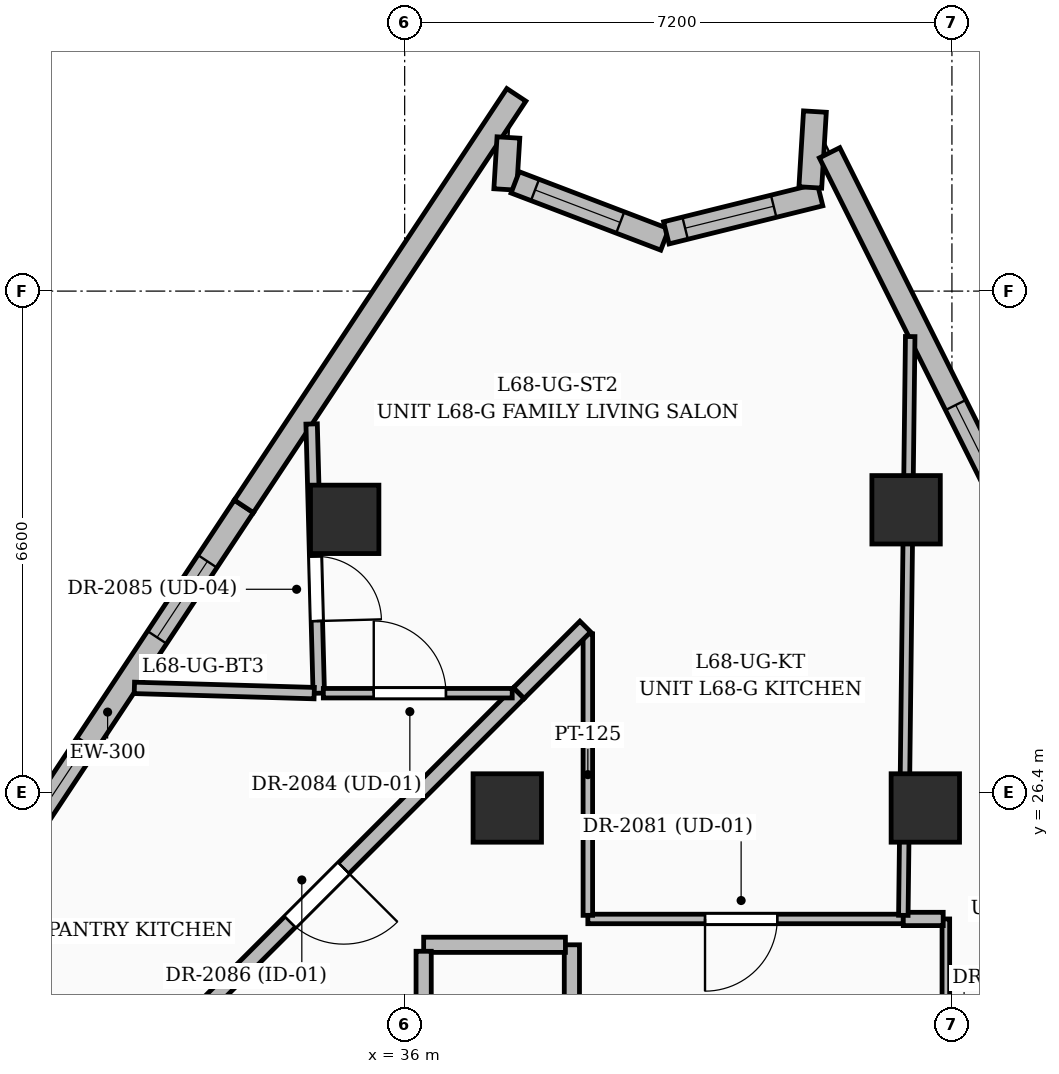
"""IFC4 building model, lengths in metres.
Left out: names, types, materials, properties, quantities, classifications, styles, units other than length and angle.
Written with IfcOpenShell. Run it as: python <this file> out.ifc"""

import sys

from ifc_helpers import new_model, si_unit, direction, frame, frame_2d, origin, origin_2d, place, context, subcontext, project, spatial, rectangle, extrude, element, fill, save


model = new_model("IFC4")
c1 = context("Model", 3, precision=1e-05, world=origin(), true_north=direction((0.0, 1.0)))
c2 = subcontext(c1, "Body", "Model", "MODEL_VIEW")
j1 = project(units=[si_unit("LENGTHUNIT", "METRE"), si_unit("PLANEANGLEUNIT", "RADIAN")], contexts=[c1])
p1 = place(None, origin())
s1 = spatial("IfcSite", under=j1, at=p1, CompositionType="ELEMENT")
p2 = place(p1, origin())
s2 = spatial("IfcBuilding", under=s1, at=p2, CompositionType="ELEMENT")
p3 = place(p2, frame((0.0, 0.0, 263.25)))
s3 = spatial("IfcBuildingStorey", under=s2, at=p3, CompositionType="ELEMENT", Elevation=263.25)
for number, where, z_axis, x_axis in (
    (1, (42.85, 26.2, 0.0), (0.0, 0.0, 1.0), (1.0, 0.0, 0.0)),
    (2, (37.35, 26.2, 0.0), (0.0, 0.0, 1.0), (1.0, 0.0, 0.0)),
    (3, (42.597, 30.123, 0.0), (0.0, 0.0, 1.0), (1.0, 0.0, 0.0)),
    (4, (35.211, 29.997, 0.0), (0.0, 0.0, 1.0), (1.0, 0.0, 0.0)),
):
    element("IfcColumn", number, at=place(p3, frame(where, z_axis=z_axis, x_axis=x_axis)), inside=s3, PredefinedType="COLUMN", context=c2, shape_type="SweptSolid", body=[
        extrude(rectangle(XDim=0.9, YDim=0.9, at=origin_2d()), origin(), (0.0, 0.0, 1.0), 3.75),
    ])
p4 = place(p3, frame((30.3, 24.755, 0.0), z_axis=(0.0, 0.0, 1.0), x_axis=(0.552146443909, 0.833747146609, 0.0)))
e5 = element("IfcWall", 5, at=p4, inside=s3, PredefinedType="SOLIDWALL", context=c2, shape_type="SweptSolid", body=[
    extrude(rectangle(XDim=6.493, YDim=0.3, at=frame_2d((3.246, 0.0))), origin(), (0.0, 0.0, 1.0), 3.5),
])
p5 = place(p4, frame((4.425, 0.0, 0.8)))
e6 = element("IfcOpeningElement", 6, at=p5, cuts=e5, PredefinedType="OPENING", context=c2, shape_type="SweptSolid", body=[
    extrude(rectangle(XDim=1.2, YDim=1.8, at=frame_2d((0.6, 0.9))), frame((0.0, 0.16, 0.0), z_axis=(0.0, -1.0, 0.0), x_axis=(1.0, 0.0, 0.0)), (0.0, 0.0, 1.0), 0.32),
])
p6 = place(p4, frame((1.55, 0.0, 0.8)))
e7 = element("IfcOpeningElement", 7, at=p6, cuts=e5, PredefinedType="OPENING", context=c2, shape_type="SweptSolid", body=[
    extrude(rectangle(XDim=1.2, YDim=1.8, at=frame_2d((0.6, 0.9))), frame((0.0, 0.16, 0.0), z_axis=(0.0, -1.0, 0.0), x_axis=(1.0, 0.0, 0.0)), (0.0, 0.0, 1.0), 0.32),
])
p7 = place(p3, frame((33.885, 30.168, 0.0), z_axis=(0.0, 0.0, 1.0), x_axis=(0.552102995184, 0.833775918763, 0.0)))
e8 = element("IfcWall", 8, at=p7, inside=s3, PredefinedType="SOLIDWALL", context=c2, shape_type="SweptSolid", body=[
    extrude(rectangle(XDim=6.493, YDim=0.3, at=frame_2d((3.247, 0.0))), origin(), (0.0, 0.0, 1.0), 3.5),
])
p8 = place(p3, frame((37.365, 35.021, 0.0), z_axis=(0.0, 0.0, 1.0), x_axis=(-0.060624262888, -0.998160657785, 0.0)))
e9 = element("IfcWall", 9, at=p8, inside=s3, PredefinedType="SOLIDWALL", context=c2, shape_type="SweptSolid", body=[
    extrude(rectangle(XDim=0.685, YDim=0.3, at=frame_2d((0.342, 0.0))), origin(), (0.0, 0.0, 1.0), 3.5),
])
p9 = place(p3, frame((37.454, 34.431, 0.0), z_axis=(0.0, 0.0, 1.0), x_axis=(0.934285742141, -0.356525107155, 0.0)))
e10 = element("IfcWall", 10, at=p9, inside=s3, PredefinedType="SOLIDWALL", context=c2, shape_type="SweptSolid", body=[
    extrude(rectangle(XDim=2.108, YDim=0.3, at=frame_2d((1.054, 0.0))), origin(), (0.0, 0.0, 1.0), 3.5),
])
p10 = place(p9, frame((0.28, 0.0, 0.8)))
e11 = element("IfcOpeningElement", 11, at=p10, cuts=e10, PredefinedType="OPENING", context=c2, shape_type="SweptSolid", body=[
    extrude(rectangle(XDim=1.2, YDim=1.8, at=frame_2d((0.6, 0.9))), frame((0.0, 0.16, 0.0), z_axis=(0.0, -1.0, 0.0), x_axis=(1.0, 0.0, 0.0)), (0.0, 0.0, 1.0), 0.32),
])
p11 = place(p3, frame((39.442, 33.766, 0.0), z_axis=(0.0, 0.0, 1.0), x_axis=(0.970636719037, 0.240550118805, 0.0)))
e12 = element("IfcWall", 12, at=p11, inside=s3, PredefinedType="SOLIDWALL", context=c2, shape_type="SweptSolid", body=[
    extrude(rectangle(XDim=2.084, YDim=0.3, at=frame_2d((1.042, 0.0))), origin(), (0.0, 0.0, 1.0), 3.5),
])
p12 = place(p11, frame((0.255, 0.0, 0.8)))
e13 = element("IfcOpeningElement", 13, at=p12, cuts=e12, PredefinedType="OPENING", context=c2, shape_type="SweptSolid", body=[
    extrude(rectangle(XDim=1.2, YDim=1.8, at=frame_2d((0.6, 0.9))), frame((0.0, 0.16, 0.0), z_axis=(0.0, -1.0, 0.0), x_axis=(1.0, 0.0, 0.0)), (0.0, 0.0, 1.0), 0.32),
])
p13 = place(p3, frame((41.337, 34.364, 0.0), z_axis=(0.0, 0.0, 1.0), x_axis=(0.060554036278, 0.998164920587, 0.0)))
e14 = element("IfcWall", 14, at=p13, inside=s3, PredefinedType="SOLIDWALL", context=c2, shape_type="SweptSolid", body=[
    extrude(rectangle(XDim=1.0, YDim=0.3, at=frame_2d((0.5, 0.0))), origin(), (0.0, 0.0, 1.0), 3.5),
])
p14 = place(p3, frame((41.59, 34.82, 0.0), z_axis=(0.0, 0.0, 1.0), x_axis=(0.4472135955, -0.894427191, 0.0)))
e15 = element("IfcWall", 15, at=p14, inside=s3, PredefinedType="SOLIDWALL", context=c2, shape_type="SweptSolid", body=[
    extrude(rectangle(XDim=5.607, YDim=0.3, at=frame_2d((2.804, 0.0))), origin(), (0.0, 0.0, 1.0), 3.5),
])
p15 = place(p14, frame((3.71, 0.0, 0.8)))
e16 = element("IfcOpeningElement", 16, at=p15, cuts=e15, PredefinedType="OPENING", context=c2, shape_type="SweptSolid", body=[
    extrude(rectangle(XDim=1.2, YDim=1.8, at=frame_2d((0.6, 0.9))), frame((0.0, 0.16, 0.0), z_axis=(0.0, -1.0, 0.0), x_axis=(1.0, 0.0, 0.0)), (0.0, 0.0, 1.0), 0.32),
])
p16 = place(p3, frame((38.2, 20.65, 0.0), z_axis=(0.0, 0.0, 1.0), x_axis=(0.0, 1.0, 0.0)))
e17 = element("IfcWall", 17, at=p16, inside=s3, PredefinedType="PARTITIONING", context=c2, shape_type="SweptSolid", body=[
    extrude(rectangle(XDim=3.75, YDim=0.2, at=frame_2d((1.875, 0.0))), origin(), (0.0, 0.0, 1.0), 3.5),
])
p17 = place(p3, frame((38.115, 24.4, 0.0), z_axis=(0.0, 0.0, 1.0), x_axis=(-1.0, 0.0, 0.0)))
e18 = element("IfcWall", 18, at=p17, inside=s3, PredefinedType="PARTITIONING", context=c2, shape_type="SweptSolid", body=[
    extrude(rectangle(XDim=1.865, YDim=0.2, at=frame_2d((0.933, 0.0))), origin(), (0.0, 0.0, 1.0), 2.685),
])
p18 = place(p3, frame((36.25, 24.315, 0.0), z_axis=(0.0, 0.0, 1.0), x_axis=(0.0, -1.0, 0.0)))
e19 = element("IfcWall", 19, at=p18, inside=s3, PredefinedType="PARTITIONING", context=c2, shape_type="SweptSolid", body=[
    extrude(rectangle(XDim=6.965, YDim=0.2, at=frame_2d((3.482, 0.0))), origin(), (0.0, 0.0, 1.0), 2.685),
])
p19 = place(p18, frame((2.881, 0.0, 0.0)))
e20 = element("IfcOpeningElement", 20, at=p19, cuts=e19, PredefinedType="OPENING", context=c2, shape_type="SweptSolid", body=[
    extrude(rectangle(XDim=1.0, YDim=2.2, at=frame_2d((0.5, 1.1))), frame((0.0, 0.11, 0.0), z_axis=(0.0, -1.0, 0.0), x_axis=(1.0, 0.0, 0.0)), (0.0, 0.0, 1.0), 0.22),
])
p20 = place(p3, frame((42.56, 24.74, 0.0), z_axis=(0.0, 0.0, 1.0), x_axis=(-1.0, 0.0, 0.0)))
e21 = element("IfcWall", 21, at=p20, inside=s3, PredefinedType="PARTITIONING", context=c2, shape_type="SweptSolid", body=[
    extrude(rectangle(XDim=4.15, YDim=0.125, at=frame_2d((2.075, 0.0))), origin(), (0.0, 0.0, 1.0), 3.5),
])
p21 = place(p20, frame((1.658, 0.0, 0.0)))
e22 = element("IfcOpeningElement", 22, at=p21, cuts=e21, PredefinedType="OPENING", context=c2, shape_type="SweptSolid", body=[
    extrude(rectangle(XDim=0.95, YDim=2.2, at=frame_2d((0.475, 1.1))), frame((0.0, 0.072, 0.0), z_axis=(0.0, -1.0, 0.0), x_axis=(1.0, 0.0, 0.0)), (0.0, 0.0, 1.0), 0.145),
])
p22 = place(p3, frame((38.41, 24.788, 0.0), z_axis=(0.0, 0.0, 1.0), x_axis=(0.0, 1.0, 0.0)))
e23 = element("IfcWall", 23, at=p22, inside=s3, PredefinedType="PARTITIONING", context=c2, shape_type="SweptSolid", body=[
    extrude(rectangle(XDim=3.702, YDim=0.125, at=frame_2d((1.851, 0.0))), origin(), (0.0, 0.0, 1.0), 2.52),
])
p23 = place(p3, frame((43.12, 21.345, 0.0), z_axis=(0.0, 0.0, 1.0), x_axis=(0.0, 1.0, 0.0)))
e24 = element("IfcWall", 24, at=p23, inside=s3, PredefinedType="PARTITIONING", context=c2, shape_type="SweptSolid", body=[
    extrude(rectangle(XDim=3.395, YDim=0.1, at=frame_2d((1.698, 0.0))), origin(), (0.0, 0.0, 1.0), 2.685),
])
p24 = place(p23, frame((1.205, 0.0, 0.0)))
e25 = element("IfcOpeningElement", 25, at=p24, cuts=e24, PredefinedType="OPENING", context=c2, shape_type="SweptSolid", body=[
    extrude(rectangle(XDim=0.9, YDim=2.15, at=frame_2d((0.45, 1.075))), frame((0.0, 0.06, 0.0), z_axis=(0.0, -1.0, 0.0), x_axis=(1.0, 0.0, 0.0)), (0.0, 0.0, 1.0), 0.12),
])
p25 = place(p3, frame((43.085, 24.74, 0.0), z_axis=(0.0, 0.0, 1.0), x_axis=(-1.0, 0.0, 0.0)))
e26 = element("IfcWall", 26, at=p25, inside=s3, PredefinedType="PARTITIONING", context=c2, shape_type="SweptSolid", body=[
    extrude(rectangle(XDim=0.525, YDim=0.175, at=frame_2d((0.262, 0.0))), origin(), (0.0, 0.0, 1.0), 3.5),
])
p26 = place(p3, frame((38.376, 28.586, 0.0), z_axis=(0.0, 0.0, 1.0), x_axis=(-0.707106781187, -0.707106781187, 0.0)))
e27 = element("IfcWall", 27, at=p26, inside=s3, PredefinedType="PARTITIONING", context=c2, shape_type="SweptSolid", body=[
    extrude(rectangle(XDim=1.24, YDim=0.2, at=frame_2d((0.62, 0.0))), origin(), (0.0, 0.0, 1.0), 3.5),
])
p27 = place(p3, frame((37.5, 27.71, 0.0), z_axis=(0.0, 0.0, 1.0), x_axis=(-0.707106781187, -0.707106781187, 0.0)))
e28 = element("IfcWall", 28, at=p27, inside=s3, PredefinedType="PARTITIONING", context=c2, shape_type="SweptSolid", body=[
    extrude(rectangle(XDim=7.449, YDim=0.2, at=frame_2d((3.725, 0.0))), origin(), (0.0, 0.0, 1.0), 2.764),
])
p28 = place(p27, frame((3.255, 0.0, 0.0)))
e29 = element("IfcOpeningElement", 29, at=p28, cuts=e28, PredefinedType="OPENING", context=c2, shape_type="SweptSolid", body=[
    extrude(rectangle(XDim=1.0, YDim=2.2, at=frame_2d((0.5, 1.1))), frame((0.0, 0.11, 0.0), z_axis=(0.0, -1.0, 0.0), x_axis=(1.0, 0.0, 0.0)), (0.0, 0.0, 1.0), 0.22),
])
p29 = place(p3, frame((42.561, 24.788, 0.0), z_axis=(0.0, 0.0, 1.0), x_axis=(0.011862322193, 0.999929640181, 0.0)))
e30 = element("IfcWall", 30, at=p29, inside=s3, PredefinedType="PARTITIONING", context=c2, shape_type="SweptSolid", body=[
    extrude(rectangle(XDim=7.615, YDim=0.125, at=frame_2d((3.808, 0.0))), origin(), (0.0, 0.0, 1.0), 2.764),
])
p30 = place(p3, frame((34.776, 31.252, 0.0), z_axis=(0.0, 0.0, 1.0), x_axis=(0.026596598545, -0.999646247903, 0.0)))
e31 = element("IfcWall", 31, at=p30, inside=s3, PredefinedType="PARTITIONING", context=c2, shape_type="SweptSolid", body=[
    extrude(rectangle(XDim=3.543, YDim=0.15, at=frame_2d((1.771, 0.0))), origin(), (0.0, 0.0, 1.0), 2.82),
])
p31 = place(p30, frame((1.744, 0.0, 0.0)))
e32 = element("IfcOpeningElement", 32, at=p31, cuts=e31, PredefinedType="OPENING", context=c2, shape_type="SweptSolid", body=[
    extrude(rectangle(XDim=0.85, YDim=2.1, at=frame_2d((0.425, 1.05))), frame((0.0, 0.085, 0.0), z_axis=(0.0, -1.0, 0.0), x_axis=(1.0, 0.0, 0.0)), (0.0, 0.0, 1.0), 0.17),
])
p32 = place(p3, frame((34.93, 27.71, 0.0), z_axis=(0.0, 0.0, 1.0), x_axis=(1.0, 0.0, 0.0)))
e33 = element("IfcWall", 33, at=p32, inside=s3, PredefinedType="PARTITIONING", context=c2, shape_type="SweptSolid", body=[
    extrude(rectangle(XDim=2.485, YDim=0.125, at=frame_2d((1.243, 0.0))), origin(), (0.0, 0.0, 1.0), 2.764),
])
p33 = place(p32, frame((0.663, 0.0, 0.0)))
e34 = element("IfcOpeningElement", 34, at=p33, cuts=e33, PredefinedType="OPENING", context=c2, shape_type="SweptSolid", body=[
    extrude(rectangle(XDim=0.95, YDim=2.2, at=frame_2d((0.475, 1.1))), frame((0.0, 0.072, 0.0), z_axis=(0.0, -1.0, 0.0), x_axis=(1.0, 0.0, 0.0)), (0.0, 0.0, 1.0), 0.145),
])
p34 = place(p3, frame((32.444, 27.78, 0.0), z_axis=(0.0, 0.0, 1.0), x_axis=(0.999576888009, -0.029086851968, 0.0)))
e35 = element("IfcWall", 35, at=p34, inside=s3, PredefinedType="PARTITIONING", context=c2, shape_type="SweptSolid", body=[
    extrude(rectangle(XDim=2.367, YDim=0.15, at=frame_2d((1.184, 0.0))), origin(), (0.0, 0.0, 1.0), 2.82),
])
p35 = place(p5, origin())
e36 = element("IfcWindow", 36, at=p35, inside=s3, PartitioningType="SINGLE_PANEL", PredefinedType="WINDOW", context=c2, shape_type="SweptSolid", body=[
    extrude(rectangle(XDim=1.2, YDim=1.8, at=frame_2d((0.6, 0.9))), frame((0.0, 0.03, 0.0), z_axis=(0.0, -1.0, 0.0), x_axis=(1.0, 0.0, 0.0)), (0.0, 0.0, 1.0), 0.06),
])
fill(e6, e36)
p36 = place(p6, origin())
e37 = element("IfcWindow", 37, at=p36, inside=s3, PartitioningType="SINGLE_PANEL", PredefinedType="WINDOW", context=c2, shape_type="SweptSolid", body=[
    extrude(rectangle(XDim=1.2, YDim=1.8, at=frame_2d((0.6, 0.9))), frame((0.0, 0.03, 0.0), z_axis=(0.0, -1.0, 0.0), x_axis=(1.0, 0.0, 0.0)), (0.0, 0.0, 1.0), 0.06),
])
fill(e7, e37)
p37 = place(p10, origin())
e38 = element("IfcWindow", 38, at=p37, inside=s3, PartitioningType="SINGLE_PANEL", PredefinedType="WINDOW", context=c2, shape_type="SweptSolid", body=[
    extrude(rectangle(XDim=1.2, YDim=1.8, at=frame_2d((0.6, 0.9))), frame((0.0, 0.03, 0.0), z_axis=(0.0, -1.0, 0.0), x_axis=(1.0, 0.0, 0.0)), (0.0, 0.0, 1.0), 0.06),
])
fill(e11, e38)
p38 = place(p12, origin())
e39 = element("IfcWindow", 39, at=p38, inside=s3, PartitioningType="SINGLE_PANEL", PredefinedType="WINDOW", context=c2, shape_type="SweptSolid", body=[
    extrude(rectangle(XDim=1.2, YDim=1.8, at=frame_2d((0.6, 0.9))), frame((0.0, 0.03, 0.0), z_axis=(0.0, -1.0, 0.0), x_axis=(1.0, 0.0, 0.0)), (0.0, 0.0, 1.0), 0.06),
])
fill(e13, e39)
p39 = place(p15, origin())
e40 = element("IfcWindow", 40, at=p39, inside=s3, PartitioningType="SINGLE_PANEL", PredefinedType="WINDOW", context=c2, shape_type="SweptSolid", body=[
    extrude(rectangle(XDim=1.2, YDim=1.8, at=frame_2d((0.6, 0.9))), frame((0.0, 0.03, 0.0), z_axis=(0.0, -1.0, 0.0), x_axis=(1.0, 0.0, 0.0)), (0.0, 0.0, 1.0), 0.06),
])
fill(e16, e40)
p40 = place(p21, origin())
e41 = element("IfcDoor", 41, at=p40, inside=s3, OperationType="SINGLE_SWING_RIGHT", PredefinedType="DOOR", context=c2, shape_type="SweptSolid", body=[
    extrude(rectangle(XDim=0.95, YDim=2.2, at=frame_2d((0.475, 1.1))), frame((0.0, 0.025, 0.0), z_axis=(0.0, -1.0, 0.0), x_axis=(1.0, 0.0, 0.0)), (0.0, 0.0, 1.0), 0.05),
])
fill(e22, e41)
p41 = place(p33, origin())
e42 = element("IfcDoor", 42, at=p41, inside=s3, OperationType="SINGLE_SWING_LEFT", PredefinedType="DOOR", context=c2, shape_type="SweptSolid", body=[
    extrude(rectangle(XDim=0.95, YDim=2.2, at=frame_2d((0.475, 1.1))), frame((0.0, 0.025, 0.0), z_axis=(0.0, -1.0, 0.0), x_axis=(1.0, 0.0, 0.0)), (0.0, 0.0, 1.0), 0.05),
])
fill(e34, e42)
p42 = place(p31, origin())
e43 = element("IfcDoor", 43, at=p42, inside=s3, OperationType="SINGLE_SWING_RIGHT", PredefinedType="DOOR", context=c2, shape_type="SweptSolid", body=[
    extrude(rectangle(XDim=0.85, YDim=2.1, at=frame_2d((0.425, 1.05))), frame((0.0, 0.025, 0.0), z_axis=(0.0, -1.0, 0.0), x_axis=(1.0, 0.0, 0.0)), (0.0, 0.0, 1.0), 0.05),
])
fill(e32, e43)
p43 = place(p28, origin())
e44 = element("IfcDoor", 44, at=p43, inside=s3, OperationType="SINGLE_SWING_LEFT", PredefinedType="DOOR", context=c2, shape_type="SweptSolid", body=[
    extrude(rectangle(XDim=1.0, YDim=2.2, at=frame_2d((0.5, 1.1))), frame((0.0, 0.025, 0.0), z_axis=(0.0, -1.0, 0.0), x_axis=(1.0, 0.0, 0.0)), (0.0, 0.0, 1.0), 0.05),
])
fill(e29, e44)
save(model, sys.argv[1])
